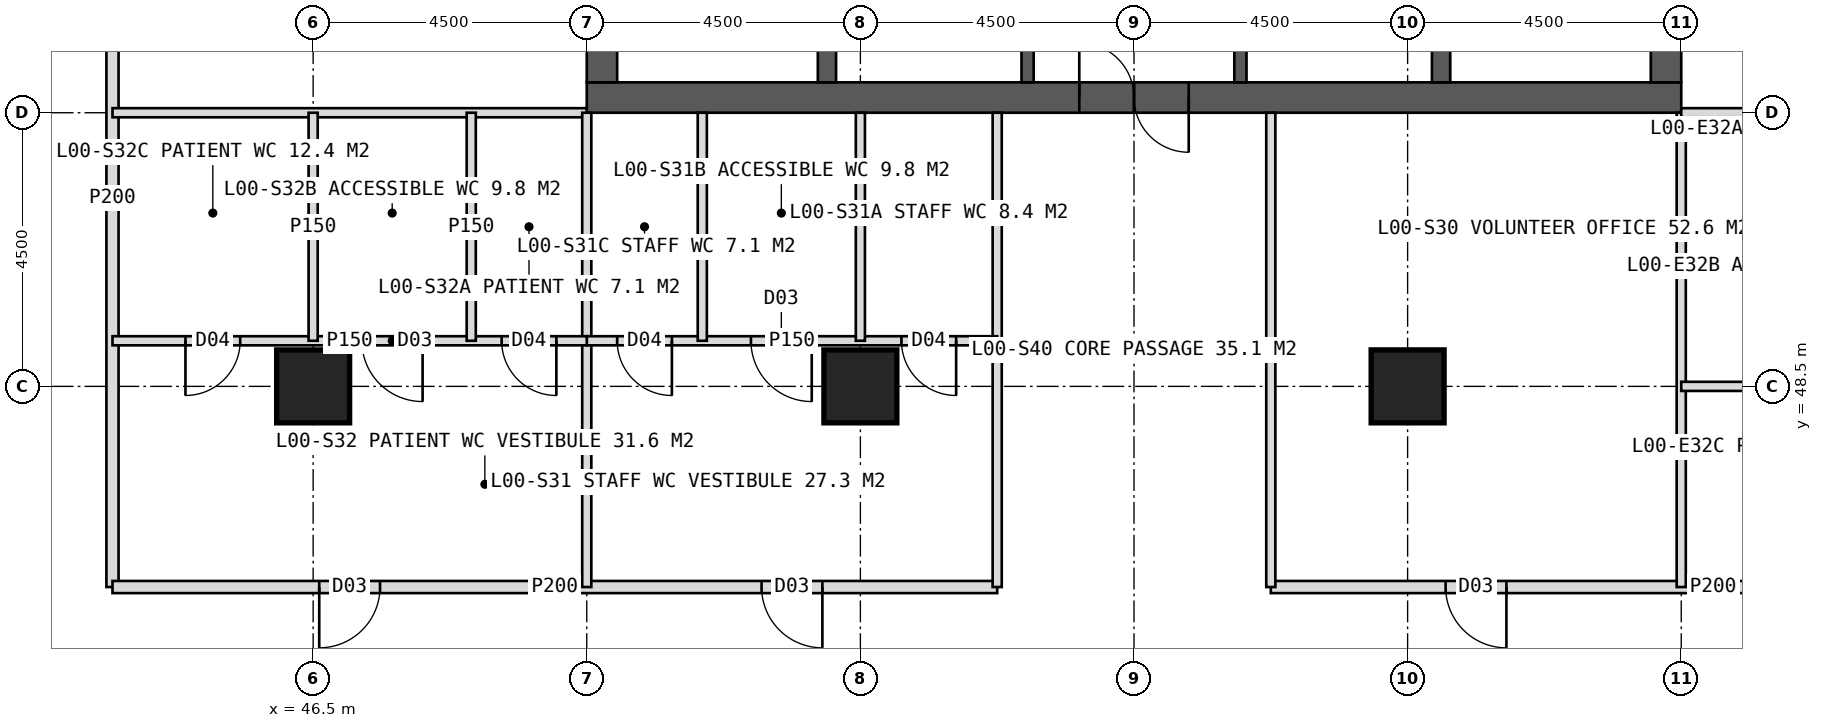
"""IFC4 building model, lengths in metres.
Left out: names, types, materials, properties, quantities, classifications, styles, units other than length and angle.
Written with IfcOpenShell. Run it as: python <this file> out.ifc"""

import sys

from ifc_helpers import new_model, si_unit, direction, frame, frame_2d, origin, origin_2d, place, context, subcontext, project, spatial, rectangle, hollow_rectangle, extrude, element, fill, save


model = new_model("IFC4")
c1 = context("Model", 3, precision=1e-05, world=origin(), true_north=direction((0.0, 1.0)))
c2 = subcontext(c1, "Body", "Model", "MODEL_VIEW")
j1 = project(units=[si_unit("LENGTHUNIT", "METRE"), si_unit("PLANEANGLEUNIT", "RADIAN")], contexts=[c1])
p1 = place(None, origin())
s1 = spatial("IfcSite", under=j1, at=p1, CompositionType="ELEMENT")
p2 = place(p1, origin())
s2 = spatial("IfcBuilding", under=s1, at=p2, CompositionType="ELEMENT")
p3 = place(p2, origin())
s3 = spatial("IfcBuildingStorey", under=s2, at=p3, CompositionType="ELEMENT", Elevation=0.0)
p4 = place(p3, frame((51.0, 53.25, 0.0), z_axis=(0.0, 0.0, 1.0), x_axis=(1.0, 0.0, 0.0)))
e1 = element("IfcWall", 1, at=p4, inside=s3, PredefinedType="SHEAR", context=c2, shape_type="SweptSolid", body=[
    extrude(rectangle(XDim=18.0, YDim=0.5, at=frame_2d((9.0, 0.0))), origin(), (0.0, 0.0, 1.0), 6.0),
])
p5 = place(p4, frame((8.1, 0.0, 0.0)))
e2 = element("IfcOpeningElement", 2, at=p5, cuts=e1, PredefinedType="OPENING", context=c2, shape_type="SweptSolid", body=[
    extrude(rectangle(XDim=1.8, YDim=2.2, at=frame_2d((0.9, 1.1))), frame((0.0, 0.26, 0.0), z_axis=(0.0, -1.0, 0.0), x_axis=(1.0, 0.0, 0.0)), (0.0, 0.0, 1.0), 0.52),
])
p6 = place(p3, frame((51.25, 53.5, 0.0), z_axis=(0.0, 0.0, 1.0), x_axis=(0.0, 1.0, 0.0)))
e3 = element("IfcWall", 3, at=p6, inside=s3, PredefinedType="SHEAR", context=c2, shape_type="SweptSolid", body=[
    extrude(rectangle(XDim=17.0, YDim=0.5, at=frame_2d((8.5, 0.0))), origin(), (0.0, 0.0, 1.0), 6.0),
])
p7 = place(p6, frame((6.0, 0.0, 0.0)))
e4 = element("IfcOpeningElement", 4, at=p7, cuts=e3, PredefinedType="OPENING", context=c2, shape_type="SweptSolid", body=[
    extrude(rectangle(XDim=1.5, YDim=2.2, at=frame_2d((0.75, 1.1))), frame((0.0, 0.26, 0.0), z_axis=(0.0, -1.0, 0.0), x_axis=(1.0, 0.0, 0.0)), (0.0, 0.0, 1.0), 0.52),
])
p8 = place(p3, frame((68.75, 53.5, 0.0), z_axis=(0.0, 0.0, 1.0), x_axis=(0.0, 1.0, 0.0)))
e5 = element("IfcWall", 5, at=p8, inside=s3, PredefinedType="SHEAR", context=c2, shape_type="SweptSolid", body=[
    extrude(rectangle(XDim=17.0, YDim=0.5, at=frame_2d((8.5, 0.0))), origin(), (0.0, 0.0, 1.0), 6.0),
])
p9 = place(p8, frame((9.5, 0.0, 0.0)))
e6 = element("IfcOpeningElement", 6, at=p9, cuts=e5, PredefinedType="OPENING", context=c2, shape_type="SweptSolid", body=[
    extrude(rectangle(XDim=1.5, YDim=2.2, at=frame_2d((0.75, 1.1))), frame((0.0, 0.26, 0.0), z_axis=(0.0, -1.0, 0.0), x_axis=(1.0, 0.0, 0.0)), (0.0, 0.0, 1.0), 0.52),
])
for number, where, z_axis, x_axis in (
    (7, (54.95, 53.5, 0.0), (0.0, 0.0, 1.0), (0.0, 1.0, 0.0)),
    (8, (65.05, 53.5, 0.0), (0.0, 0.0, 1.0), (0.0, 1.0, 0.0)),
):
    element("IfcWall", number, at=place(p3, frame(where, z_axis=z_axis, x_axis=x_axis)), inside=s3, PredefinedType="SHEAR", context=c2, shape_type="SweptSolid", body=[
        extrude(rectangle(XDim=17.0, YDim=0.3, at=frame_2d((8.5, 0.0))), origin(), (0.0, 0.0, 1.0), 6.0),
    ])
p10 = place(p3, frame((58.25, 53.5, 0.0), z_axis=(0.0, 0.0, 1.0), x_axis=(0.0, 1.0, 0.0)))
e9 = element("IfcWall", 9, at=p10, inside=s3, PredefinedType="SHEAR", context=c2, shape_type="SweptSolid", body=[
    extrude(rectangle(XDim=17.0, YDim=0.2, at=frame_2d((8.5, 0.0))), origin(), (0.0, 0.0, 1.0), 6.0),
])
p11 = place(p10, frame((1.375, 0.0, 0.0)))
e10 = element("IfcOpeningElement", 10, at=p11, cuts=e9, PredefinedType="OPENING", context=c2, shape_type="SweptSolid", body=[
    extrude(rectangle(XDim=1.4, YDim=2.2, at=frame_2d((0.7, 1.1))), frame((0.0, 0.11, 0.0), z_axis=(0.0, -1.0, 0.0), x_axis=(1.0, 0.0, 0.0)), (0.0, 0.0, 1.0), 0.22),
])
p12 = place(p10, frame((5.675, 0.0, 0.0)))
e11 = element("IfcOpeningElement", 11, at=p12, cuts=e9, PredefinedType="OPENING", context=c2, shape_type="SweptSolid", body=[
    extrude(rectangle(XDim=1.4, YDim=2.2, at=frame_2d((0.7, 1.1))), frame((0.0, 0.11, 0.0), z_axis=(0.0, -1.0, 0.0), x_axis=(1.0, 0.0, 0.0)), (0.0, 0.0, 1.0), 0.22),
])
p13 = place(p10, frame((9.925, 0.0, 0.0)))
e12 = element("IfcOpeningElement", 12, at=p13, cuts=e9, PredefinedType="OPENING", context=c2, shape_type="SweptSolid", body=[
    extrude(rectangle(XDim=1.4, YDim=2.2, at=frame_2d((0.7, 1.1))), frame((0.0, 0.11, 0.0), z_axis=(0.0, -1.0, 0.0), x_axis=(1.0, 0.0, 0.0)), (0.0, 0.0, 1.0), 0.22),
])
p14 = place(p10, frame((14.225, 0.0, 0.0)))
e13 = element("IfcOpeningElement", 13, at=p14, cuts=e9, PredefinedType="OPENING", context=c2, shape_type="SweptSolid", body=[
    extrude(rectangle(XDim=1.4, YDim=2.2, at=frame_2d((0.7, 1.1))), frame((0.0, 0.11, 0.0), z_axis=(0.0, -1.0, 0.0), x_axis=(1.0, 0.0, 0.0)), (0.0, 0.0, 1.0), 0.22),
])
p15 = place(p3, frame((61.75, 53.5, 0.0), z_axis=(0.0, 0.0, 1.0), x_axis=(0.0, 1.0, 0.0)))
e14 = element("IfcWall", 14, at=p15, inside=s3, PredefinedType="SHEAR", context=c2, shape_type="SweptSolid", body=[
    extrude(rectangle(XDim=17.0, YDim=0.2, at=frame_2d((8.5, 0.0))), origin(), (0.0, 0.0, 1.0), 6.0),
])
p16 = place(p15, frame((1.375, 0.0, 0.0)))
e15 = element("IfcOpeningElement", 15, at=p16, cuts=e14, PredefinedType="OPENING", context=c2, shape_type="SweptSolid", body=[
    extrude(rectangle(XDim=1.4, YDim=2.2, at=frame_2d((0.7, 1.1))), frame((0.0, 0.11, 0.0), z_axis=(0.0, -1.0, 0.0), x_axis=(1.0, 0.0, 0.0)), (0.0, 0.0, 1.0), 0.22),
])
p17 = place(p15, frame((5.675, 0.0, 0.0)))
e16 = element("IfcOpeningElement", 16, at=p17, cuts=e14, PredefinedType="OPENING", context=c2, shape_type="SweptSolid", body=[
    extrude(rectangle(XDim=1.4, YDim=2.2, at=frame_2d((0.7, 1.1))), frame((0.0, 0.11, 0.0), z_axis=(0.0, -1.0, 0.0), x_axis=(1.0, 0.0, 0.0)), (0.0, 0.0, 1.0), 0.22),
])
p18 = place(p15, frame((9.925, 0.0, 0.0)))
e17 = element("IfcOpeningElement", 17, at=p18, cuts=e14, PredefinedType="OPENING", context=c2, shape_type="SweptSolid", body=[
    extrude(rectangle(XDim=1.4, YDim=2.2, at=frame_2d((0.7, 1.1))), frame((0.0, 0.11, 0.0), z_axis=(0.0, -1.0, 0.0), x_axis=(1.0, 0.0, 0.0)), (0.0, 0.0, 1.0), 0.22),
])
p19 = place(p15, frame((14.225, 0.0, 0.0)))
e18 = element("IfcOpeningElement", 18, at=p19, cuts=e14, PredefinedType="OPENING", context=c2, shape_type="SweptSolid", body=[
    extrude(rectangle(XDim=1.4, YDim=2.2, at=frame_2d((0.7, 1.1))), frame((0.0, 0.11, 0.0), z_axis=(0.0, -1.0, 0.0), x_axis=(1.0, 0.0, 0.0)), (0.0, 0.0, 1.0), 0.22),
])
for number, where, z_axis, x_axis in (
    (19, (46.5, 48.5, 0.0), (0.0, 0.0, 1.0), (1.0, 0.0, 0.0)),
    (20, (55.5, 48.5, 0.0), (0.0, 0.0, 1.0), (1.0, 0.0, 0.0)),
    (21, (64.5, 48.5, 0.0), (0.0, 0.0, 1.0), (1.0, 0.0, 0.0)),
):
    element("IfcColumn", number, at=place(p3, frame(where, z_axis=z_axis, x_axis=x_axis)), inside=s3, PredefinedType="COLUMN", context=c2, shape_type="SweptSolid", body=[
        extrude(hollow_rectangle(XDim=1.2, YDim=1.2, WallThickness=0.1, at=origin_2d()), origin(), (0.0, 0.0, 1.0), 6.0),
    ])
p20 = place(p3, frame((43.2, 45.2, 0.0), z_axis=(0.0, 0.0, 1.0), x_axis=(0.0, 1.0, 0.0)))
e22 = element("IfcWall", 22, at=p20, inside=s3, PredefinedType="PARTITIONING", context=c2, shape_type="SweptSolid", body=[
    extrude(rectangle(XDim=12.8, YDim=0.2, at=frame_2d((6.4, 0.0))), origin(), (0.0, 0.0, 1.0), 5.7),
])
p21 = place(p20, frame((9.8, 0.0, 0.0)))
e23 = element("IfcOpeningElement", 23, at=p21, cuts=e22, PredefinedType="OPENING", context=c2, shape_type="SweptSolid", body=[
    extrude(rectangle(XDim=1.0, YDim=2.1, at=frame_2d((0.5, 1.05))), frame((0.0, 0.11, 0.0), z_axis=(0.0, -1.0, 0.0), x_axis=(1.0, 0.0, 0.0)), (0.0, 0.0, 1.0), 0.22),
])
p22 = place(p3, frame((51.0, 53.0, 0.0), z_axis=(0.0, 0.0, 1.0), x_axis=(-1.0, 0.0, 0.0)))
e24 = element("IfcWall", 24, at=p22, inside=s3, PredefinedType="PARTITIONING", context=c2, shape_type="SweptSolid", body=[
    extrude(rectangle(XDim=7.8, YDim=0.15, at=frame_2d((3.9, 0.0))), origin(), (0.0, 0.0, 1.0), 5.7),
])
p23 = place(p3, frame((76.8, 45.2, 0.0), z_axis=(0.0, 0.0, 1.0), x_axis=(-1.0, 0.0, 0.0)))
e25 = element("IfcWall", 25, at=p23, inside=s3, PredefinedType="PARTITIONING", context=c2, shape_type="SweptSolid", body=[
    extrude(rectangle(XDim=14.55, YDim=0.2, at=frame_2d((7.275, 0.0))), origin(), (0.0, 0.0, 1.0), 5.7),
])
p24 = place(p23, frame((10.675, 0.0, 0.0)))
e26 = element("IfcOpeningElement", 26, at=p24, cuts=e25, PredefinedType="OPENING", context=c2, shape_type="SweptSolid", body=[
    extrude(rectangle(XDim=1.0, YDim=2.1, at=frame_2d((0.5, 1.05))), frame((0.0, 0.11, 0.0), z_axis=(0.0, -1.0, 0.0), x_axis=(1.0, 0.0, 0.0)), (0.0, 0.0, 1.0), 0.22),
])
p25 = place(p3, frame((57.75, 45.2, 0.0), z_axis=(0.0, 0.0, 1.0), x_axis=(-1.0, 0.0, 0.0)))
e27 = element("IfcWall", 27, at=p25, inside=s3, PredefinedType="PARTITIONING", context=c2, shape_type="SweptSolid", body=[
    extrude(rectangle(XDim=14.55, YDim=0.2, at=frame_2d((7.275, 0.0))), origin(), (0.0, 0.0, 1.0), 5.7),
])
p26 = place(p25, frame((2.875, 0.0, 0.0)))
e28 = element("IfcOpeningElement", 28, at=p26, cuts=e27, PredefinedType="OPENING", context=c2, shape_type="SweptSolid", body=[
    extrude(rectangle(XDim=1.0, YDim=2.1, at=frame_2d((0.5, 1.05))), frame((0.0, 0.11, 0.0), z_axis=(0.0, -1.0, 0.0), x_axis=(1.0, 0.0, 0.0)), (0.0, 0.0, 1.0), 0.22),
])
p27 = place(p25, frame((10.15, 0.0, 0.0)))
e29 = element("IfcOpeningElement", 29, at=p27, cuts=e27, PredefinedType="OPENING", context=c2, shape_type="SweptSolid", body=[
    extrude(rectangle(XDim=1.0, YDim=2.1, at=frame_2d((0.5, 1.05))), frame((0.0, 0.11, 0.0), z_axis=(0.0, -1.0, 0.0), x_axis=(1.0, 0.0, 0.0)), (0.0, 0.0, 1.0), 0.22),
])
for number, where, z_axis, x_axis in (
    (30, (69.0, 53.0, 0.0), (0.0, 0.0, 1.0), (0.0, -1.0, 0.0)),
    (31, (62.25, 53.0, 0.0), (0.0, 0.0, 1.0), (0.0, -1.0, 0.0)),
    (32, (57.75, 53.0, 0.0), (0.0, 0.0, 1.0), (0.0, -1.0, 0.0)),
    (33, (51.0, 53.0, 0.0), (0.0, 0.0, 1.0), (0.0, -1.0, 0.0)),
):
    element("IfcWall", number, at=place(p3, frame(where, z_axis=z_axis, x_axis=x_axis)), inside=s3, PredefinedType="PARTITIONING", context=c2, shape_type="SweptSolid", body=[
        extrude(rectangle(XDim=7.8, YDim=0.15, at=frame_2d((3.9, 0.0))), origin(), (0.0, 0.0, 1.0), 5.7),
    ])
p28 = place(p3, frame((57.75, 49.25, 0.0), z_axis=(0.0, 0.0, 1.0), x_axis=(-1.0, 0.0, 0.0)))
e34 = element("IfcWall", 34, at=p28, inside=s3, PredefinedType="PARTITIONING", context=c2, shape_type="SweptSolid", body=[
    extrude(rectangle(XDim=6.75, YDim=0.15, at=frame_2d((3.375, 0.0))), origin(), (0.0, 0.0, 1.0), 5.7),
])
p29 = place(p28, frame((0.675, 0.0, 0.0)))
e35 = element("IfcOpeningElement", 35, at=p29, cuts=e34, PredefinedType="OPENING", context=c2, shape_type="SweptSolid", body=[
    extrude(rectangle(XDim=0.9, YDim=2.1, at=frame_2d((0.45, 1.05))), frame((0.0, 0.085, 0.0), z_axis=(0.0, -1.0, 0.0), x_axis=(1.0, 0.0, 0.0)), (0.0, 0.0, 1.0), 0.17),
])
p30 = place(p28, frame((3.05, 0.0, 0.0)))
e36 = element("IfcOpeningElement", 36, at=p30, cuts=e34, PredefinedType="OPENING", context=c2, shape_type="SweptSolid", body=[
    extrude(rectangle(XDim=1.0, YDim=2.1, at=frame_2d((0.5, 1.05))), frame((0.0, 0.085, 0.0), z_axis=(0.0, -1.0, 0.0), x_axis=(1.0, 0.0, 0.0)), (0.0, 0.0, 1.0), 0.17),
])
p31 = place(p28, frame((5.35, 0.0, 0.0)))
e37 = element("IfcOpeningElement", 37, at=p31, cuts=e34, PredefinedType="OPENING", context=c2, shape_type="SweptSolid", body=[
    extrude(rectangle(XDim=0.9, YDim=2.1, at=frame_2d((0.45, 1.05))), frame((0.0, 0.085, 0.0), z_axis=(0.0, -1.0, 0.0), x_axis=(1.0, 0.0, 0.0)), (0.0, 0.0, 1.0), 0.17),
])
p32 = place(p3, frame((55.5, 53.0, 0.0), z_axis=(0.0, 0.0, 1.0), x_axis=(0.0, -1.0, 0.0)))
e38 = element("IfcWall", 38, at=p32, inside=s3, PredefinedType="PARTITIONING", context=c2, shape_type="SweptSolid", body=[
    extrude(rectangle(XDim=3.75, YDim=0.15, at=frame_2d((1.875, 0.0))), origin(), (0.0, 0.0, 1.0), 4.8),
])
p33 = place(p3, frame((52.9, 53.0, 0.0), z_axis=(0.0, 0.0, 1.0), x_axis=(0.0, -1.0, 0.0)))
e39 = element("IfcWall", 39, at=p33, inside=s3, PredefinedType="PARTITIONING", context=c2, shape_type="SweptSolid", body=[
    extrude(rectangle(XDim=3.75, YDim=0.15, at=frame_2d((1.875, 0.0))), origin(), (0.0, 0.0, 1.0), 5.7),
])
p34 = place(p3, frame((51.0, 49.25, 0.0), z_axis=(0.0, 0.0, 1.0), x_axis=(-1.0, 0.0, 0.0)))
e40 = element("IfcWall", 40, at=p34, inside=s3, PredefinedType="PARTITIONING", context=c2, shape_type="SweptSolid", body=[
    extrude(rectangle(XDim=7.8, YDim=0.15, at=frame_2d((3.9, 0.0))), origin(), (0.0, 0.0, 1.0), 5.7),
])
p35 = place(p34, frame((0.5, 0.0, 0.0)))
e41 = element("IfcOpeningElement", 41, at=p35, cuts=e40, PredefinedType="OPENING", context=c2, shape_type="SweptSolid", body=[
    extrude(rectangle(XDim=0.9, YDim=2.1, at=frame_2d((0.45, 1.05))), frame((0.0, 0.085, 0.0), z_axis=(0.0, -1.0, 0.0), x_axis=(1.0, 0.0, 0.0)), (0.0, 0.0, 1.0), 0.17),
])
p36 = place(p34, frame((2.7, 0.0, 0.0)))
e42 = element("IfcOpeningElement", 42, at=p36, cuts=e40, PredefinedType="OPENING", context=c2, shape_type="SweptSolid", body=[
    extrude(rectangle(XDim=1.0, YDim=2.1, at=frame_2d((0.5, 1.05))), frame((0.0, 0.085, 0.0), z_axis=(0.0, -1.0, 0.0), x_axis=(1.0, 0.0, 0.0)), (0.0, 0.0, 1.0), 0.17),
])
p37 = place(p34, frame((5.7, 0.0, 0.0)))
e43 = element("IfcOpeningElement", 43, at=p37, cuts=e40, PredefinedType="OPENING", context=c2, shape_type="SweptSolid", body=[
    extrude(rectangle(XDim=0.9, YDim=2.1, at=frame_2d((0.45, 1.05))), frame((0.0, 0.085, 0.0), z_axis=(0.0, -1.0, 0.0), x_axis=(1.0, 0.0, 0.0)), (0.0, 0.0, 1.0), 0.17),
])
p38 = place(p3, frame((49.1, 53.0, 0.0), z_axis=(0.0, 0.0, 1.0), x_axis=(0.0, -1.0, 0.0)))
e44 = element("IfcWall", 44, at=p38, inside=s3, PredefinedType="PARTITIONING", context=c2, shape_type="SweptSolid", body=[
    extrude(rectangle(XDim=3.75, YDim=0.15, at=frame_2d((1.875, 0.0))), origin(), (0.0, 0.0, 1.0), 5.7),
])
p39 = place(p3, frame((46.5, 53.0, 0.0), z_axis=(0.0, 0.0, 1.0), x_axis=(0.0, -1.0, 0.0)))
e45 = element("IfcWall", 45, at=p39, inside=s3, PredefinedType="PARTITIONING", context=c2, shape_type="SweptSolid", body=[
    extrude(rectangle(XDim=3.75, YDim=0.15, at=frame_2d((1.875, 0.0))), origin(), (0.0, 0.0, 1.0), 4.9),
])
p40 = place(p3, frame((69.0, 53.0, 0.0), z_axis=(0.0, 0.0, 1.0), x_axis=(1.0, 0.0, 0.0)))
e46 = element("IfcWall", 46, at=p40, inside=s3, PredefinedType="PARTITIONING", context=c2, shape_type="SweptSolid", body=[
    extrude(rectangle(XDim=7.8, YDim=0.15, at=frame_2d((3.9, 0.0))), origin(), (0.0, 0.0, 1.0), 5.7),
])
p41 = place(p3, frame((69.0, 51.1, 0.0), z_axis=(0.0, 0.0, 1.0), x_axis=(1.0, 0.0, 0.0)))
e47 = element("IfcWall", 47, at=p41, inside=s3, PredefinedType="PARTITIONING", context=c2, shape_type="SweptSolid", body=[
    extrude(rectangle(XDim=3.75, YDim=0.15, at=frame_2d((1.875, 0.0))), origin(), (0.0, 0.0, 1.0), 5.7),
])
p42 = place(p3, frame((69.0, 48.5, 0.0), z_axis=(0.0, 0.0, 1.0), x_axis=(1.0, 0.0, 0.0)))
e48 = element("IfcWall", 48, at=p42, inside=s3, PredefinedType="PARTITIONING", context=c2, shape_type="SweptSolid", body=[
    extrude(rectangle(XDim=3.75, YDim=0.15, at=frame_2d((1.875, 0.0))), origin(), (0.0, 0.0, 1.0), 4.9),
])
p43 = place(p24, origin())
e49 = element("IfcDoor", 49, at=p43, inside=s3, OperationType="SINGLE_SWING_LEFT", PredefinedType="DOOR", context=c2, shape_type="SweptSolid", body=[
    extrude(rectangle(XDim=1.0, YDim=2.1, at=frame_2d((0.5, 1.05))), frame((0.0, 0.025, 0.0), z_axis=(0.0, -1.0, 0.0), x_axis=(1.0, 0.0, 0.0)), (0.0, 0.0, 1.0), 0.05),
])
fill(e26, e49)
p44 = place(p26, origin())
e50 = element("IfcDoor", 50, at=p44, inside=s3, OperationType="SINGLE_SWING_LEFT", PredefinedType="DOOR", context=c2, shape_type="SweptSolid", body=[
    extrude(rectangle(XDim=1.0, YDim=2.1, at=frame_2d((0.5, 1.05))), frame((0.0, 0.025, 0.0), z_axis=(0.0, -1.0, 0.0), x_axis=(1.0, 0.0, 0.0)), (0.0, 0.0, 1.0), 0.05),
])
fill(e28, e50)
p45 = place(p27, origin())
e51 = element("IfcDoor", 51, at=p45, inside=s3, OperationType="SINGLE_SWING_RIGHT", PredefinedType="DOOR", context=c2, shape_type="SweptSolid", body=[
    extrude(rectangle(XDim=1.0, YDim=2.1, at=frame_2d((0.5, 1.05))), frame((0.0, 0.025, 0.0), z_axis=(0.0, -1.0, 0.0), x_axis=(1.0, 0.0, 0.0)), (0.0, 0.0, 1.0), 0.05),
])
fill(e29, e51)
p46 = place(p5, origin())
e52 = element("IfcDoor", 52, at=p46, inside=s3, OperationType="DOUBLE_DOOR_SINGLE_SWING", PredefinedType="DOOR", context=c2, shape_type="SweptSolid", body=[
    extrude(rectangle(XDim=1.8, YDim=2.2, at=frame_2d((0.9, 1.1))), frame((0.0, 0.025, 0.0), z_axis=(0.0, -1.0, 0.0), x_axis=(1.0, 0.0, 0.0)), (0.0, 0.0, 1.0), 0.05),
])
fill(e2, e52)
p47 = place(p29, origin())
e53 = element("IfcDoor", 53, at=p47, inside=s3, OperationType="SINGLE_SWING_LEFT", PredefinedType="DOOR", context=c2, shape_type="SweptSolid", body=[
    extrude(rectangle(XDim=0.9, YDim=2.1, at=frame_2d((0.45, 1.05))), frame((0.0, 0.025, 0.0), z_axis=(0.0, -1.0, 0.0), x_axis=(1.0, 0.0, 0.0)), (0.0, 0.0, 1.0), 0.05),
])
fill(e35, e53)
p48 = place(p30, origin())
e54 = element("IfcDoor", 54, at=p48, inside=s3, OperationType="SINGLE_SWING_LEFT", PredefinedType="DOOR", context=c2, shape_type="SweptSolid", body=[
    extrude(rectangle(XDim=1.0, YDim=2.1, at=frame_2d((0.5, 1.05))), frame((0.0, 0.025, 0.0), z_axis=(0.0, -1.0, 0.0), x_axis=(1.0, 0.0, 0.0)), (0.0, 0.0, 1.0), 0.05),
])
fill(e36, e54)
p49 = place(p31, origin())
e55 = element("IfcDoor", 55, at=p49, inside=s3, OperationType="SINGLE_SWING_LEFT", PredefinedType="DOOR", context=c2, shape_type="SweptSolid", body=[
    extrude(rectangle(XDim=0.9, YDim=2.1, at=frame_2d((0.45, 1.05))), frame((0.0, 0.025, 0.0), z_axis=(0.0, -1.0, 0.0), x_axis=(1.0, 0.0, 0.0)), (0.0, 0.0, 1.0), 0.05),
])
fill(e37, e55)
p50 = place(p35, origin())
e56 = element("IfcDoor", 56, at=p50, inside=s3, OperationType="SINGLE_SWING_LEFT", PredefinedType="DOOR", context=c2, shape_type="SweptSolid", body=[
    extrude(rectangle(XDim=0.9, YDim=2.1, at=frame_2d((0.45, 1.05))), frame((0.0, 0.025, 0.0), z_axis=(0.0, -1.0, 0.0), x_axis=(1.0, 0.0, 0.0)), (0.0, 0.0, 1.0), 0.05),
])
fill(e41, e56)
p51 = place(p36, origin())
e57 = element("IfcDoor", 57, at=p51, inside=s3, OperationType="SINGLE_SWING_LEFT", PredefinedType="DOOR", context=c2, shape_type="SweptSolid", body=[
    extrude(rectangle(XDim=1.0, YDim=2.1, at=frame_2d((0.5, 1.05))), frame((0.0, 0.025, 0.0), z_axis=(0.0, -1.0, 0.0), x_axis=(1.0, 0.0, 0.0)), (0.0, 0.0, 1.0), 0.05),
])
fill(e42, e57)
p52 = place(p37, origin())
e58 = element("IfcDoor", 58, at=p52, inside=s3, OperationType="SINGLE_SWING_RIGHT", PredefinedType="DOOR", context=c2, shape_type="SweptSolid", body=[
    extrude(rectangle(XDim=0.9, YDim=2.1, at=frame_2d((0.45, 1.05))), frame((0.0, 0.025, 0.0), z_axis=(0.0, -1.0, 0.0), x_axis=(1.0, 0.0, 0.0)), (0.0, 0.0, 1.0), 0.05),
])
fill(e43, e58)
save(model, sys.argv[1])
